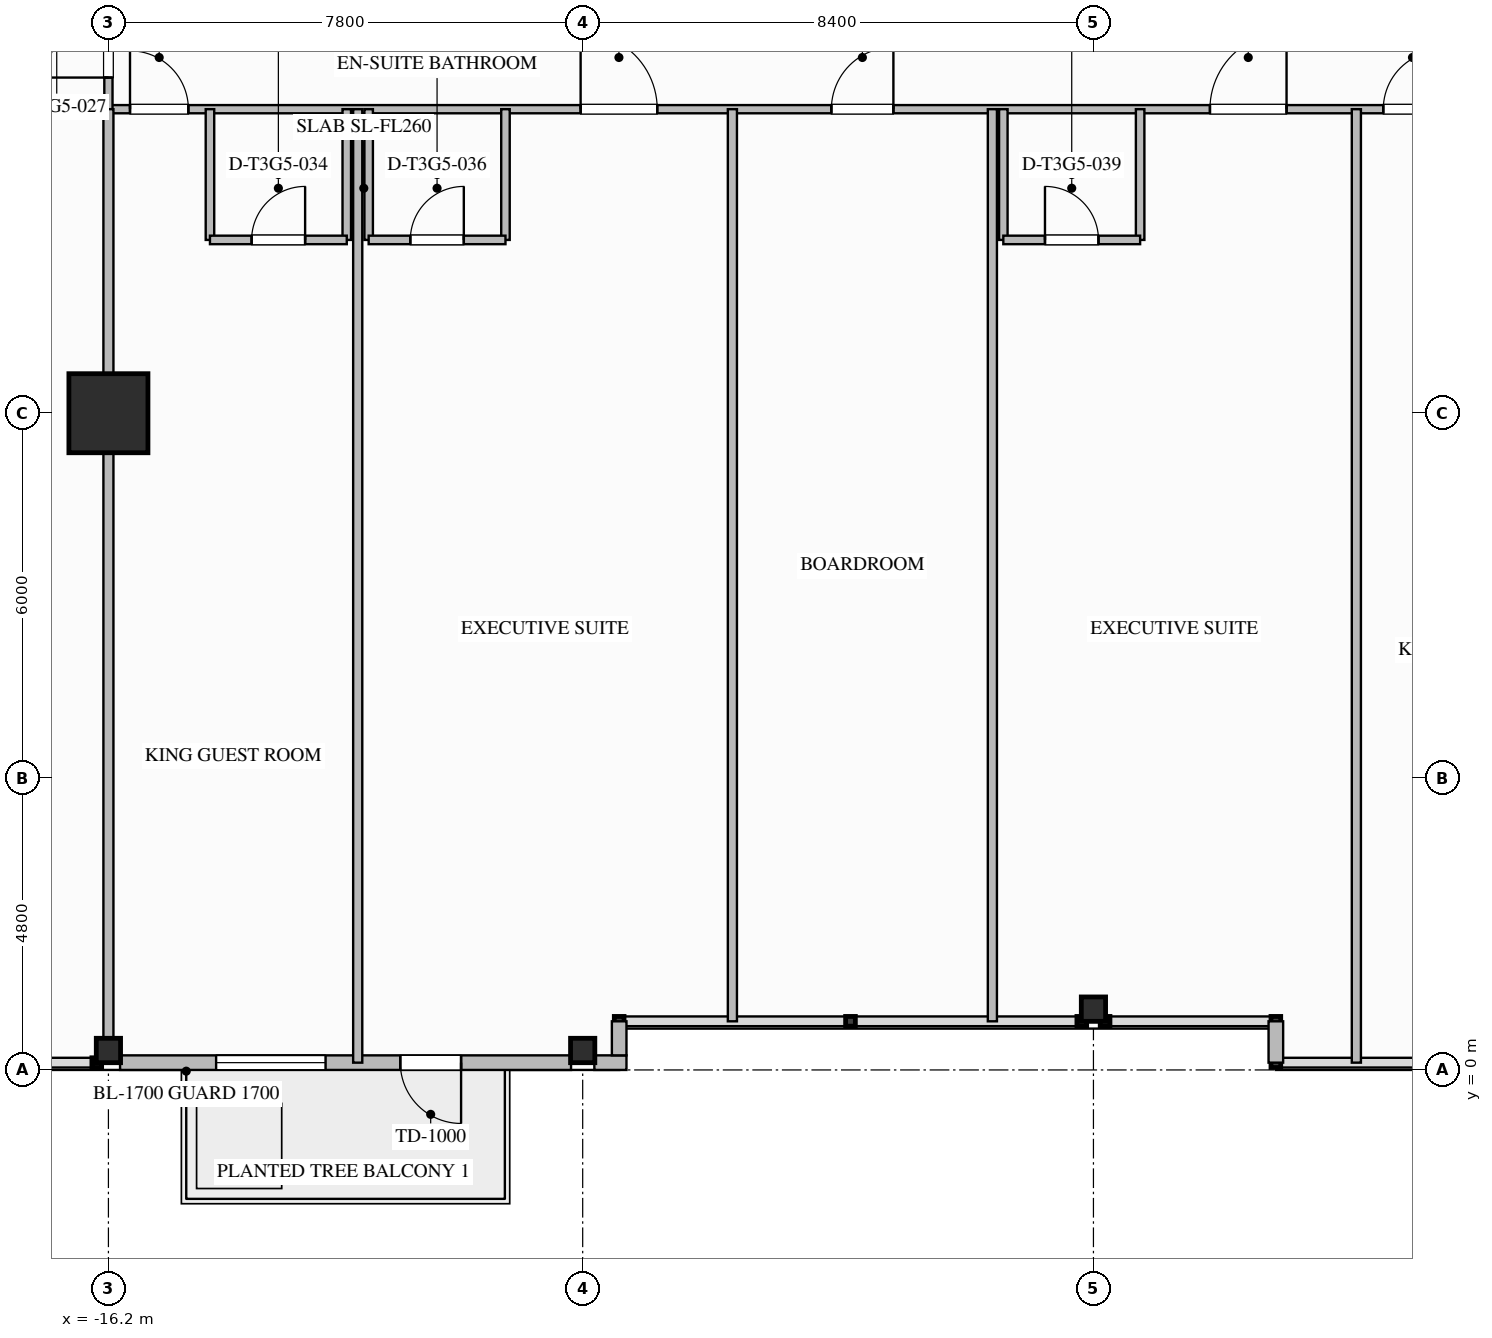
"""IFC4 building model, lengths in metres.
Left out: names, types, materials, properties, quantities, classifications, styles, units other than length and angle.
Written with IfcOpenShell. Run it as: python <this file> out.ifc"""

import sys

from ifc_helpers import new_model, si_unit, direction, frame, frame_2d, origin, origin_2d, place, context, subcontext, project, spatial, rectangle, i_section, extrude, element, fill, save


model = new_model("IFC4")
c1 = context("Model", 3, precision=1e-05, world=origin(), true_north=direction((0.0, 1.0)))
c2 = subcontext(c1, "Body", "Model", "MODEL_VIEW")
j1 = project(units=[si_unit("LENGTHUNIT", "METRE"), si_unit("PLANEANGLEUNIT", "RADIAN")], contexts=[c1])
p1 = place(None, origin())
s1 = spatial("IfcSite", under=j1, at=p1, CompositionType="ELEMENT")
p2 = place(p1, origin())
s2 = spatial("IfcBuilding", under=s1, at=p2, CompositionType="ELEMENT")
p3 = place(p2, frame((0.0, 0.0, 193.0)))
s3 = spatial("IfcBuildingStorey", under=s2, at=p3, CompositionType="ELEMENT", Elevation=193.0)
p4 = place(p3, frame((-16.2, 10.8, 0.0), z_axis=(0.0, 0.0, 1.0), x_axis=(1.0, 0.0, 0.0)))
e1 = element("IfcColumn", 1, at=p4, inside=s3, PredefinedType="COLUMN", context=c2, shape_type="SweptSolid", body=[
    extrude(rectangle(XDim=1.3, YDim=1.3, at=origin_2d()), origin(), (0.0, 0.0, 1.0), 3.55),
])
for number, where, z_axis, x_axis in (
    (2, (-16.2, 0.32, 0.0), (0.0, 0.0, 1.0), (0.0, 1.0, 0.0)),
    (3, (-8.4, 0.32, 0.0), (0.0, 0.0, 1.0), (0.0, 1.0, 0.0)),
    (4, (0.0, 1.0, 0.0), (0.0, 0.0, 1.0), (0.0, 1.0, 0.0)),
):
    element("IfcColumn", number, at=place(p3, frame(where, z_axis=z_axis, x_axis=x_axis)), inside=s3, PredefinedType="COLUMN", context=c2, shape_type="SweptSolid", body=[
        extrude(i_section(OverallWidth=0.401, OverallDepth=0.399, WebThickness=0.025, FlangeThickness=0.04, FilletRadius=0.025, at=origin_2d()), origin(), (0.0, 0.0, 1.0), 3.547),
    ])
p5 = place(p3, frame((-8.592, 0.12, 0.0), z_axis=(0.0, 0.0, 1.0), x_axis=(-1.0, 0.0, 0.0)))
e5 = element("IfcWall", 5, at=p5, inside=s3, PredefinedType="STANDARD", context=c2, shape_type="SweptSolid", body=[
    extrude(rectangle(XDim=7.417, YDim=0.24, at=frame_2d((3.708, 0.0))), origin(), (0.0, 0.0, 1.0), 2.753),
])
p6 = place(p5, frame((1.808, 0.0, 0.0)))
e6 = element("IfcOpeningElement", 6, at=p6, cuts=e5, PredefinedType="OPENING", context=c2, shape_type="SweptSolid", body=[
    extrude(rectangle(XDim=1.0, YDim=2.2, at=frame_2d((0.5, 1.1))), frame((0.0, 0.13, 0.0), z_axis=(0.0, -1.0, 0.0), x_axis=(1.0, 0.0, 0.0)), (0.0, 0.0, 1.0), 0.26),
])
p7 = place(p5, frame((4.037, 0.0, 0.75)))
e7 = element("IfcOpeningElement", 7, at=p7, cuts=e5, PredefinedType="OPENING", context=c2, shape_type="SweptSolid", body=[
    extrude(rectangle(XDim=1.8, YDim=1.903, at=frame_2d((0.9, 0.952))), frame((0.0, 0.13, 0.0), z_axis=(0.0, -1.0, 0.0), x_axis=(1.0, 0.0, 0.0)), (0.0, 0.0, 1.0), 0.26),
])
p8 = place(p3, frame((-7.68, 0.12, 0.0), z_axis=(0.0, 0.0, 1.0), x_axis=(-1.0, 0.0, 0.0)))
e8 = element("IfcWall", 8, at=p8, inside=s3, PredefinedType="STANDARD", context=c2, shape_type="SweptSolid", body=[
    extrude(rectangle(XDim=0.528, YDim=0.24, at=frame_2d((0.264, 0.0))), origin(), (0.0, 0.0, 1.0), 3.29),
])
p9 = place(p3, frame((3.0, 0.12, 0.0), z_axis=(0.0, 0.0, 1.0), x_axis=(0.0, 1.0, 0.0)))
e9 = element("IfcWall", 9, at=p9, inside=s3, PredefinedType="STANDARD", context=c2, shape_type="SweptSolid", body=[
    extrude(rectangle(XDim=0.68, YDim=0.24, at=frame_2d((0.34, 0.0))), origin(), (0.0, 0.0, 1.0), 3.29),
])
p10 = place(p3, frame((-7.8, 0.8, 0.0), z_axis=(0.0, 0.0, 1.0), x_axis=(0.0, -1.0, 0.0)))
e10 = element("IfcWall", 10, at=p10, inside=s3, PredefinedType="STANDARD", context=c2, shape_type="SweptSolid", body=[
    extrude(rectangle(XDim=0.56, YDim=0.24, at=frame_2d((0.28, 0.0))), origin(), (0.0, 0.0, 1.0), 3.29),
])
p11 = place(p3, frame((-16.2, 15.8, 0.0), z_axis=(0.0, 0.0, 1.0), x_axis=(1.0, 0.0, 0.0)))
e11 = element("IfcWall", 11, at=p11, inside=s3, PredefinedType="PARTITIONING", context=c2, shape_type="SweptSolid", body=[
    extrude(rectangle(XDim=24.8, YDim=0.135, at=frame_2d((12.4, 0.0))), origin(), (0.0, 0.0, 1.0), 3.29),
])
p12 = place(p11, frame((0.355, 0.0, 0.0)))
e12 = element("IfcOpeningElement", 12, at=p12, cuts=e11, PredefinedType="OPENING", context=c2, shape_type="SweptSolid", body=[
    extrude(rectangle(XDim=0.96, YDim=2.15, at=frame_2d((0.48, 1.075))), frame((0.0, 0.077, 0.0), z_axis=(0.0, -1.0, 0.0), x_axis=(1.0, 0.0, 0.0)), (0.0, 0.0, 1.0), 0.155),
])
p13 = place(p11, frame((7.766, 0.0, 0.0)))
e13 = element("IfcOpeningElement", 13, at=p13, cuts=e11, PredefinedType="OPENING", context=c2, shape_type="SweptSolid", body=[
    extrude(rectangle(XDim=1.26, YDim=2.2, at=frame_2d((0.63, 1.1))), frame((0.0, 0.077, 0.0), z_axis=(0.0, -1.0, 0.0), x_axis=(1.0, 0.0, 0.0)), (0.0, 0.0, 1.0), 0.155),
])
p14 = place(p11, frame((11.89, 0.0, 0.0)))
e14 = element("IfcOpeningElement", 14, at=p14, cuts=e11, PredefinedType="OPENING", context=c2, shape_type="SweptSolid", body=[
    extrude(rectangle(XDim=1.02, YDim=2.15, at=frame_2d((0.51, 1.075))), frame((0.0, 0.077, 0.0), z_axis=(0.0, -1.0, 0.0), x_axis=(1.0, 0.0, 0.0)), (0.0, 0.0, 1.0), 0.155),
])
p15 = place(p11, frame((18.116, 0.0, 0.0)))
e15 = element("IfcOpeningElement", 15, at=p15, cuts=e11, PredefinedType="OPENING", context=c2, shape_type="SweptSolid", body=[
    extrude(rectangle(XDim=1.26, YDim=2.2, at=frame_2d((0.63, 1.1))), frame((0.0, 0.077, 0.0), z_axis=(0.0, -1.0, 0.0), x_axis=(1.0, 0.0, 0.0)), (0.0, 0.0, 1.0), 0.155),
])
p16 = place(p11, frame((20.967, 0.0, 0.0)))
e16 = element("IfcOpeningElement", 16, at=p16, cuts=e11, PredefinedType="OPENING", context=c2, shape_type="SweptSolid", body=[
    extrude(rectangle(XDim=0.96, YDim=2.15, at=frame_2d((0.48, 1.075))), frame((0.0, 0.077, 0.0), z_axis=(0.0, -1.0, 0.0), x_axis=(1.0, 0.0, 0.0)), (0.0, 0.0, 1.0), 0.155),
])
p17 = place(p3, frame((-16.2, 15.8, 0.0), z_axis=(0.0, 0.0, 1.0), x_axis=(0.0, 1.0, 0.0)))
e17 = element("IfcWall", 17, at=p17, inside=s3, PredefinedType="PARTITIONING", context=c2, shape_type="SweptSolid", body=[
    extrude(rectangle(XDim=2.6, YDim=0.135, at=frame_2d((1.3, 0.0))), origin(), (0.0, 0.0, 1.0), 2.58),
])
p18 = place(p17, frame((0.52, 0.0, 0.0)))
e18 = element("IfcOpeningElement", 18, at=p18, cuts=e17, PredefinedType="OPENING", context=c2, shape_type="SweptSolid", body=[
    extrude(rectangle(XDim=1.02, YDim=2.15, at=frame_2d((0.51, 1.075))), frame((0.0, 0.077, 0.0), z_axis=(0.0, -1.0, 0.0), x_axis=(1.0, 0.0, 0.0)), (0.0, 0.0, 1.0), 0.155),
])
p19 = place(p3, frame((-16.2, 0.12, 0.0), z_axis=(0.0, 0.0, 1.0), x_axis=(0.0, 1.0, 0.0)))
e19 = element("IfcWall", 19, at=p19, inside=s3, PredefinedType="PARTITIONING", context=c2, shape_type="SweptSolid", body=[
    extrude(rectangle(XDim=15.68, YDim=0.165, at=frame_2d((7.84, 0.0))), origin(), (0.0, 0.0, 1.0), 2.58),
])
p20 = place(p3, frame((-14.53, 15.8, 0.0), z_axis=(0.0, 0.0, 1.0), x_axis=(0.0, -1.0, 0.0)))
e20 = element("IfcWall", 20, at=p20, inside=s3, PredefinedType="PLUMBINGWALL", context=c2, shape_type="SweptSolid", body=[
    extrude(rectangle(XDim=2.15, YDim=0.14, at=frame_2d((1.075, 0.0))), origin(), (0.0, 0.0, 1.0), 3.29),
])
p21 = place(p3, frame((-12.28, 15.8, 0.0), z_axis=(0.0, 0.0, 1.0), x_axis=(0.0, -1.0, 0.0)))
e21 = element("IfcWall", 21, at=p21, inside=s3, PredefinedType="PLUMBINGWALL", context=c2, shape_type="SweptSolid", body=[
    extrude(rectangle(XDim=2.15, YDim=0.14, at=frame_2d((1.075, 0.0))), origin(), (0.0, 0.0, 1.0), 2.868),
])
p22 = place(p3, frame((-14.53, 13.65, 0.0), z_axis=(0.0, 0.0, 1.0), x_axis=(1.0, 0.0, 0.0)))
e22 = element("IfcWall", 22, at=p22, inside=s3, PredefinedType="PLUMBINGWALL", context=c2, shape_type="SweptSolid", body=[
    extrude(rectangle(XDim=2.25, YDim=0.14, at=frame_2d((1.125, 0.0))), origin(), (0.0, 0.0, 1.0), 3.29),
])
p23 = place(p22, frame((0.685, 0.0, 0.0)))
e23 = element("IfcOpeningElement", 23, at=p23, cuts=e22, PredefinedType="OPENING", context=c2, shape_type="SweptSolid", body=[
    extrude(rectangle(XDim=0.88, YDim=2.1, at=frame_2d((0.44, 1.05))), frame((0.0, 0.08, 0.0), z_axis=(0.0, -1.0, 0.0), x_axis=(1.0, 0.0, 0.0)), (0.0, 0.0, 1.0), 0.16),
])
p24 = place(p3, frame((-12.1, 0.12, 0.0), z_axis=(0.0, 0.0, 1.0), x_axis=(0.0, 1.0, 0.0)))
e24 = element("IfcWall", 24, at=p24, inside=s3, PredefinedType="PARTITIONING", context=c2, shape_type="SweptSolid", body=[
    extrude(rectangle(XDim=15.68, YDim=0.15, at=frame_2d((7.84, 0.0))), origin(), (0.0, 0.0, 1.0), 2.868),
])
for number, where, z_axis, x_axis in (
    (25, (-11.92, 15.8, 0.0), (0.0, 0.0, 1.0), (0.0, -1.0, 0.0)),
    (26, (-9.67, 15.8, 0.0), (0.0, 0.0, 1.0), (0.0, -1.0, 0.0)),
):
    element("IfcWall", number, at=place(p3, frame(where, z_axis=z_axis, x_axis=x_axis)), inside=s3, PredefinedType="PLUMBINGWALL", context=c2, shape_type="SweptSolid", body=[
        extrude(rectangle(XDim=2.15, YDim=0.14, at=frame_2d((1.075, 0.0))), origin(), (0.0, 0.0, 1.0), 3.29),
    ])
p25 = place(p3, frame((-11.92, 13.65, 0.0), z_axis=(0.0, 0.0, 1.0), x_axis=(1.0, 0.0, 0.0)))
e27 = element("IfcWall", 27, at=p25, inside=s3, PredefinedType="PLUMBINGWALL", context=c2, shape_type="SweptSolid", body=[
    extrude(rectangle(XDim=2.25, YDim=0.14, at=frame_2d((1.125, 0.0))), origin(), (0.0, 0.0, 1.0), 3.29),
])
p26 = place(p25, frame((0.685, 0.0, 0.0)))
e28 = element("IfcOpeningElement", 28, at=p26, cuts=e27, PredefinedType="OPENING", context=c2, shape_type="SweptSolid", body=[
    extrude(rectangle(XDim=0.88, YDim=2.1, at=frame_2d((0.44, 1.05))), frame((0.0, 0.08, 0.0), z_axis=(0.0, -1.0, 0.0), x_axis=(1.0, 0.0, 0.0)), (0.0, 0.0, 1.0), 0.16),
])
for number, where, z_axis, x_axis in (
    (29, (-5.938, 0.8, 0.0), (0.0, 0.0, 1.0), (0.0, 1.0, 0.0)),
    (30, (-1.662, 0.8, 0.0), (0.0, 0.0, 1.0), (0.0, 1.0, 0.0)),
):
    element("IfcWall", number, at=place(p3, frame(where, z_axis=z_axis, x_axis=x_axis)), inside=s3, PredefinedType="PARTITIONING", context=c2, shape_type="SweptSolid", body=[
        extrude(rectangle(XDim=15.0, YDim=0.15, at=frame_2d((7.5, 0.0))), origin(), (0.0, 0.0, 1.0), 3.29),
    ])
for number, where, z_axis, x_axis in (
    (31, (-1.482, 15.8, 0.0), (0.0, 0.0, 1.0), (0.0, -1.0, 0.0)),
    (32, (0.768, 15.8, 0.0), (0.0, 0.0, 1.0), (0.0, -1.0, 0.0)),
):
    element("IfcWall", number, at=place(p3, frame(where, z_axis=z_axis, x_axis=x_axis)), inside=s3, PredefinedType="PLUMBINGWALL", context=c2, shape_type="SweptSolid", body=[
        extrude(rectangle(XDim=2.15, YDim=0.14, at=frame_2d((1.075, 0.0))), origin(), (0.0, 0.0, 1.0), 3.29),
    ])
p27 = place(p3, frame((-1.482, 13.65, 0.0), z_axis=(0.0, 0.0, 1.0), x_axis=(1.0, 0.0, 0.0)))
e33 = element("IfcWall", 33, at=p27, inside=s3, PredefinedType="PLUMBINGWALL", context=c2, shape_type="SweptSolid", body=[
    extrude(rectangle(XDim=2.25, YDim=0.14, at=frame_2d((1.125, 0.0))), origin(), (0.0, 0.0, 1.0), 3.29),
])
p28 = place(p27, frame((0.685, 0.0, 0.0)))
e34 = element("IfcOpeningElement", 34, at=p28, cuts=e33, PredefinedType="OPENING", context=c2, shape_type="SweptSolid", body=[
    extrude(rectangle(XDim=0.88, YDim=2.1, at=frame_2d((0.44, 1.05))), frame((0.0, 0.08, 0.0), z_axis=(0.0, -1.0, 0.0), x_axis=(1.0, 0.0, 0.0)), (0.0, 0.0, 1.0), 0.16),
])
p29 = place(p3, frame((4.324, 0.12, 0.0), z_axis=(0.0, 0.0, 1.0), x_axis=(0.0, 1.0, 0.0)))
e35 = element("IfcWall", 35, at=p29, inside=s3, PredefinedType="PARTITIONING", context=c2, shape_type="SweptSolid", body=[
    extrude(rectangle(XDim=15.68, YDim=0.15, at=frame_2d((7.84, 0.0))), origin(), (0.0, 0.0, 1.0), 3.29),
])
p30 = place(p6, origin())
e36 = element("IfcDoor", 36, at=p30, inside=s3, OperationType="SINGLE_SWING_LEFT", PredefinedType="DOOR", context=c2, shape_type="SweptSolid", body=[
    extrude(rectangle(XDim=1.0, YDim=2.2, at=frame_2d((0.5, 1.1))), frame((0.0, 0.025, 0.0), z_axis=(0.0, -1.0, 0.0), x_axis=(1.0, 0.0, 0.0)), (0.0, 0.0, 1.0), 0.05),
])
fill(e6, e36)
p31 = place(p7, origin())
e37 = element("IfcWindow", 37, at=p31, inside=s3, PartitioningType="SINGLE_PANEL", PredefinedType="WINDOW", context=c2, shape_type="SweptSolid", body=[
    extrude(rectangle(XDim=1.8, YDim=1.903, at=frame_2d((0.9, 0.952))), frame((0.0, 0.03, 0.0), z_axis=(0.0, -1.0, 0.0), x_axis=(1.0, 0.0, 0.0)), (0.0, 0.0, 1.0), 0.06),
])
fill(e7, e37)
p32 = place(p18, origin())
e38 = element("IfcDoor", 38, at=p32, inside=s3, OperationType="SINGLE_SWING_LEFT", PredefinedType="DOOR", context=c2, shape_type="SweptSolid", body=[
    extrude(rectangle(XDim=1.02, YDim=2.15, at=frame_2d((0.51, 1.075))), frame((0.0, 0.025, 0.0), z_axis=(0.0, -1.0, 0.0), x_axis=(1.0, 0.0, 0.0)), (0.0, 0.0, 1.0), 0.05),
])
fill(e18, e38)
p33 = place(p23, origin())
e39 = element("IfcDoor", 39, at=p33, inside=s3, OperationType="SINGLE_SWING_RIGHT", PredefinedType="DOOR", context=c2, shape_type="SweptSolid", body=[
    extrude(rectangle(XDim=0.88, YDim=2.1, at=frame_2d((0.44, 1.05))), frame((0.0, 0.025, 0.0), z_axis=(0.0, -1.0, 0.0), x_axis=(1.0, 0.0, 0.0)), (0.0, 0.0, 1.0), 0.05),
])
fill(e23, e39)
p34 = place(p12, origin())
e40 = element("IfcDoor", 40, at=p34, inside=s3, OperationType="SINGLE_SWING_LEFT", PredefinedType="DOOR", context=c2, shape_type="SweptSolid", body=[
    extrude(rectangle(XDim=0.96, YDim=2.15, at=frame_2d((0.48, 1.075))), frame((0.0, 0.025, 0.0), z_axis=(0.0, -1.0, 0.0), x_axis=(1.0, 0.0, 0.0)), (0.0, 0.0, 1.0), 0.05),
])
fill(e12, e40)
p35 = place(p26, origin())
e41 = element("IfcDoor", 41, at=p35, inside=s3, OperationType="SINGLE_SWING_RIGHT", PredefinedType="DOOR", context=c2, shape_type="SweptSolid", body=[
    extrude(rectangle(XDim=0.88, YDim=2.1, at=frame_2d((0.44, 1.05))), frame((0.0, 0.025, 0.0), z_axis=(0.0, -1.0, 0.0), x_axis=(1.0, 0.0, 0.0)), (0.0, 0.0, 1.0), 0.05),
])
fill(e28, e41)
p36 = place(p13, origin())
e42 = element("IfcDoor", 42, at=p36, inside=s3, OperationType="SINGLE_SWING_LEFT", PredefinedType="DOOR", context=c2, shape_type="SweptSolid", body=[
    extrude(rectangle(XDim=1.26, YDim=2.2, at=frame_2d((0.63, 1.1))), frame((0.0, 0.025, 0.0), z_axis=(0.0, -1.0, 0.0), x_axis=(1.0, 0.0, 0.0)), (0.0, 0.0, 1.0), 0.05),
])
fill(e13, e42)
p37 = place(p14, origin())
e43 = element("IfcDoor", 43, at=p37, inside=s3, OperationType="SINGLE_SWING_RIGHT", PredefinedType="DOOR", context=c2, shape_type="SweptSolid", body=[
    extrude(rectangle(XDim=1.02, YDim=2.15, at=frame_2d((0.51, 1.075))), frame((0.0, 0.025, 0.0), z_axis=(0.0, -1.0, 0.0), x_axis=(1.0, 0.0, 0.0)), (0.0, 0.0, 1.0), 0.05),
])
fill(e14, e43)
p38 = place(p28, origin())
e44 = element("IfcDoor", 44, at=p38, inside=s3, OperationType="SINGLE_SWING_LEFT", PredefinedType="DOOR", context=c2, shape_type="SweptSolid", body=[
    extrude(rectangle(XDim=0.88, YDim=2.1, at=frame_2d((0.44, 1.05))), frame((0.0, 0.025, 0.0), z_axis=(0.0, -1.0, 0.0), x_axis=(1.0, 0.0, 0.0)), (0.0, 0.0, 1.0), 0.05),
])
fill(e34, e44)
p39 = place(p15, origin())
e45 = element("IfcDoor", 45, at=p39, inside=s3, OperationType="SINGLE_SWING_RIGHT", PredefinedType="DOOR", context=c2, shape_type="SweptSolid", body=[
    extrude(rectangle(XDim=1.26, YDim=2.2, at=frame_2d((0.63, 1.1))), frame((0.0, 0.025, 0.0), z_axis=(0.0, -1.0, 0.0), x_axis=(1.0, 0.0, 0.0)), (0.0, 0.0, 1.0), 0.05),
])
fill(e15, e45)
p40 = place(p16, origin())
e46 = element("IfcDoor", 46, at=p40, inside=s3, OperationType="SINGLE_SWING_RIGHT", PredefinedType="DOOR", context=c2, shape_type="SweptSolid", body=[
    extrude(rectangle(XDim=0.96, YDim=2.15, at=frame_2d((0.48, 1.075))), frame((0.0, 0.025, 0.0), z_axis=(0.0, -1.0, 0.0), x_axis=(1.0, 0.0, 0.0)), (0.0, 0.0, 1.0), 0.05),
])
fill(e16, e46)
save(model, sys.argv[1])
